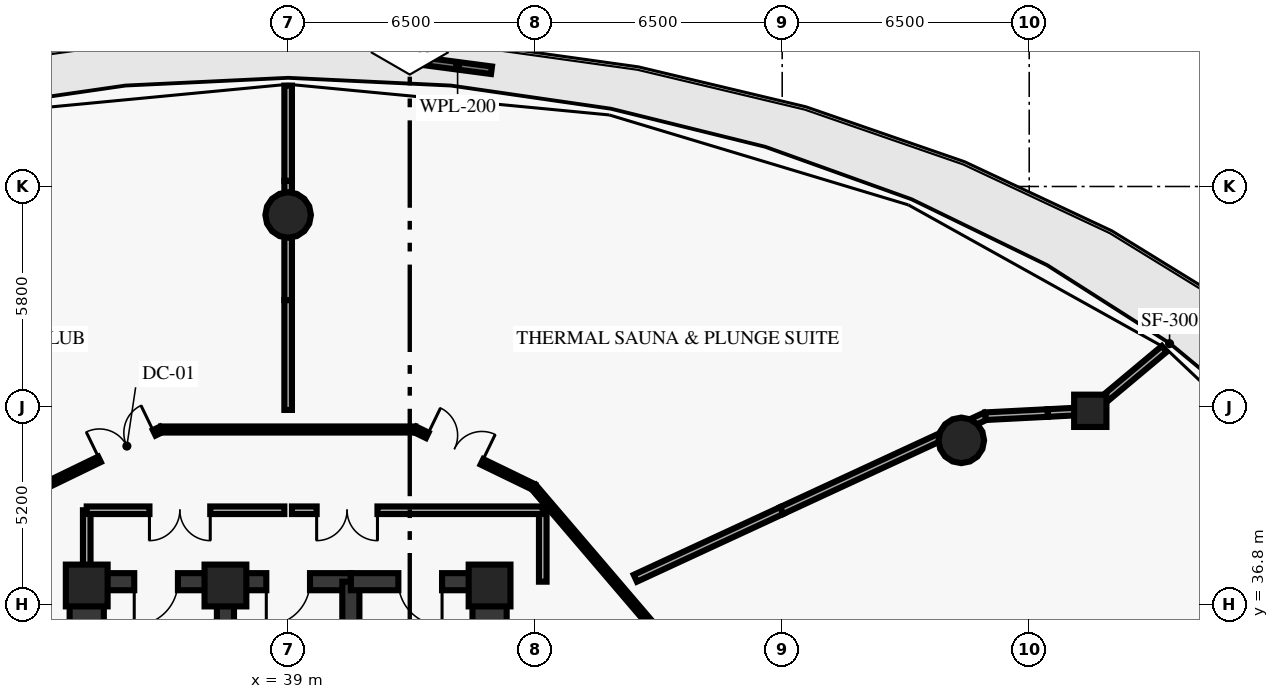
"""IFC4 building model, lengths in metres.
Left out: names, types, materials, properties, quantities, classifications, styles, units other than length and angle.
Written with IfcOpenShell. Run it as: python <this file> out.ifc"""

import sys

from ifc_helpers import new_model, si_unit, direction, frame, frame_2d, origin, origin_2d, place, context, subcontext, project, spatial, rectangle, circle, extrude, element, fill, save


model = new_model("IFC4")
c1 = context("Model", 3, precision=1e-05, world=origin(), true_north=direction((0.0, 1.0)))
c2 = subcontext(c1, "Body", "Model", "MODEL_VIEW")
j1 = project(units=[si_unit("LENGTHUNIT", "METRE"), si_unit("PLANEANGLEUNIT", "RADIAN")], contexts=[c1])
p1 = place(None, origin())
s1 = spatial("IfcSite", under=j1, at=p1, CompositionType="ELEMENT")
p2 = place(p1, origin())
s2 = spatial("IfcBuilding", under=s1, at=p2, CompositionType="ELEMENT")
p3 = place(p2, frame((0.0, 0.0, 16.0)))
s3 = spatial("IfcBuildingStorey", under=s2, at=p3, CompositionType="ELEMENT", Elevation=16.0)
for number, where, z_axis, x_axis in (
    (1, (44.3, 37.3, 0.0), (0.0, 0.0, 1.0), (1.0, 0.0, 0.0)),
    (2, (37.35, 37.3, 0.0), (0.0, 0.0, 1.0), (1.0, 0.0, 0.0)),
    (3, (33.7, 37.3, 0.0), (0.0, 0.0, 1.0), (1.0, 0.0, 0.0)),
):
    element("IfcColumn", number, at=place(p3, frame(where, z_axis=z_axis, x_axis=x_axis)), inside=s3, PredefinedType="PILASTER", context=c2, shape_type="SweptSolid", body=[
        extrude(rectangle(XDim=1.1, YDim=1.1, at=origin_2d()), origin(), (0.0, 0.0, 1.0), 4.74),
    ])
for number, where, z_axis, x_axis in (
    (4, (56.713, 41.119, 0.0), (0.0, 0.0, 1.0), (1.0, 0.0, 0.0)),
    (5, (39.0, 47.05, 0.0), (0.0, 0.0, 1.0), (1.0, 0.0, 0.0)),
):
    element("IfcColumn", number, at=place(p3, frame(where, z_axis=z_axis, x_axis=x_axis)), inside=s3, PredefinedType="COLUMN", context=c2, shape_type="SweptSolid", body=[
        extrude(circle(Radius=0.6, at=origin_2d()), origin(), (0.0, 0.0, 1.0), 4.74),
    ])
p4 = place(p3, frame((60.107, 41.897, 0.0), z_axis=(0.0, 0.0, 1.0), x_axis=(1.0, 0.0, 0.0)))
e6 = element("IfcColumn", 6, at=p4, inside=s3, PredefinedType="COLUMN", context=c2, shape_type="SweptSolid", body=[
    extrude(rectangle(XDim=0.85, YDim=0.85, at=origin_2d()), origin(), (0.0, 0.0, 1.0), 4.74),
])
for number, where, z_axis, x_axis in (
    (7, (33.7, 29.05, 0.0), (0.0, 0.0, 1.0), (0.0, 1.0, 0.0)),
    (8, (44.3, 29.05, 0.0), (0.0, 0.0, 1.0), (0.0, 1.0, 0.0)),
):
    element("IfcWall", number, at=place(p3, frame(where, z_axis=z_axis, x_axis=x_axis)), inside=s3, PredefinedType="SHEAR", context=c2, shape_type="SweptSolid", body=[
        extrude(rectangle(XDim=8.35, YDim=0.9, at=frame_2d((4.175, 0.0))), origin(), (0.0, 0.0, 1.0), 4.74),
    ])
p5 = place(p3, frame((42.566, 51.094, 0.0), z_axis=(0.0, 0.0, 1.0), x_axis=(0.991438597149, -0.130573764914, 0.0)))
e9 = element("IfcWall", 9, at=p5, inside=s3, PredefinedType="ELEMENTEDWALL", context=c2, shape_type="SweptSolid", body=[
    extrude(rectangle(XDim=1.801, YDim=0.2, at=frame_2d((0.9, 0.0))), origin(), (0.0, 0.0, 1.0), 0.65),
])
p6 = place(p3, frame((37.35, 37.4, 0.0), z_axis=(0.0, 0.0, 1.0), x_axis=(-1.0, 0.0, 0.0)))
e10 = element("IfcWall", 10, at=p6, inside=s3, PredefinedType="SHEAR", context=c2, shape_type="SweptSolid", body=[
    extrude(rectangle(XDim=3.65, YDim=0.45, at=frame_2d((1.825, 0.0))), origin(), (0.0, 0.0, 1.0), 4.74),
])
p7 = place(p6, frame((1.25, 0.0, 0.0)))
e11 = element("IfcOpeningElement", 11, at=p7, cuts=e10, PredefinedType="OPENING", context=c2, shape_type="SweptSolid", body=[
    extrude(rectangle(XDim=1.15, YDim=2.15, at=frame_2d((0.575, 1.075))), frame((0.0, 0.235, 0.0), z_axis=(0.0, -1.0, 0.0), x_axis=(1.0, 0.0, 0.0)), (0.0, 0.0, 1.0), 0.47),
])
p8 = place(p3, frame((37.35, 29.05, 0.0), z_axis=(0.0, 0.0, 1.0), x_axis=(0.0, 1.0, 0.0)))
e12 = element("IfcWall", 12, at=p8, inside=s3, PredefinedType="SHEAR", context=c2, shape_type="SweptSolid", body=[
    extrude(rectangle(XDim=8.35, YDim=0.45, at=frame_2d((4.175, 0.0))), origin(), (0.0, 0.0, 1.0), 4.74),
])
p9 = place(p3, frame((40.65, 37.4, 0.0), z_axis=(0.0, 0.0, 1.0), x_axis=(-1.0, 0.0, 0.0)))
e13 = element("IfcWall", 13, at=p9, inside=s3, PredefinedType="SHEAR", context=c2, shape_type="SweptSolid", body=[
    extrude(rectangle(XDim=3.3, YDim=0.45, at=frame_2d((1.65, 0.0))), origin(), (0.0, 0.0, 1.0), 4.74),
])
p10 = place(p9, frame((1.075, 0.0, 0.0)))
e14 = element("IfcOpeningElement", 14, at=p10, cuts=e13, PredefinedType="OPENING", context=c2, shape_type="SweptSolid", body=[
    extrude(rectangle(XDim=1.15, YDim=2.15, at=frame_2d((0.575, 1.075))), frame((0.0, 0.235, 0.0), z_axis=(0.0, -1.0, 0.0), x_axis=(1.0, 0.0, 0.0)), (0.0, 0.0, 1.0), 0.47),
])
p11 = place(p3, frame((40.65, 29.05, 0.0), z_axis=(0.0, 0.0, 1.0), x_axis=(0.0, 1.0, 0.0)))
e15 = element("IfcWall", 15, at=p11, inside=s3, PredefinedType="SHEAR", context=c2, shape_type="SweptSolid", body=[
    extrude(rectangle(XDim=8.35, YDim=0.45, at=frame_2d((4.175, 0.0))), origin(), (0.0, 0.0, 1.0), 4.74),
])
p12 = place(p3, frame((44.3, 37.4, 0.0), z_axis=(0.0, 0.0, 1.0), x_axis=(-1.0, 0.0, 0.0)))
e16 = element("IfcWall", 16, at=p12, inside=s3, PredefinedType="SHEAR", context=c2, shape_type="SweptSolid", body=[
    extrude(rectangle(XDim=3.65, YDim=0.45, at=frame_2d((1.825, 0.0))), origin(), (0.0, 0.0, 1.0), 4.74),
])
p13 = place(p12, frame((1.25, 0.0, 0.0)))
e17 = element("IfcOpeningElement", 17, at=p13, cuts=e16, PredefinedType="OPENING", context=c2, shape_type="SweptSolid", body=[
    extrude(rectangle(XDim=1.15, YDim=2.15, at=frame_2d((0.575, 1.075))), frame((0.0, 0.235, 0.0), z_axis=(0.0, -1.0, 0.0), x_axis=(1.0, 0.0, 0.0)), (0.0, 0.0, 1.0), 0.47),
])
for number, where, z_axis, x_axis in (
    (18, (33.7, 37.4, 0.0), (0.0, 0.0, 1.0), (0.0, 1.0, 0.0)),
    (19, (45.7, 37.4, 0.0), (0.0, 0.0, 1.0), (0.0, 1.0, 0.0)),
):
    element("IfcWall", number, at=place(p3, frame(where, z_axis=z_axis, x_axis=x_axis)), inside=s3, PredefinedType="SOLIDWALL", context=c2, shape_type="SweptSolid", body=[
        extrude(rectangle(XDim=1.88, YDim=0.2, at=frame_2d((0.94, 0.0))), origin(), (0.0, 0.0, 1.0), 4.74),
    ])
p14 = place(p3, frame((38.9, 39.28, 0.0), z_axis=(0.0, 0.0, 1.0), x_axis=(-1.0, 0.0, 0.0)))
e20 = element("IfcWall", 20, at=p14, inside=s3, PredefinedType="SOLIDWALL", context=c2, shape_type="SweptSolid", body=[
    extrude(rectangle(XDim=5.2, YDim=0.2, at=frame_2d((2.6, 0.0))), origin(), (0.0, 0.0, 1.0), 4.74),
])
p15 = place(p14, frame((1.95, 0.0, 0.0)))
e21 = element("IfcOpeningElement", 21, at=p15, cuts=e20, PredefinedType="OPENING", context=c2, shape_type="SweptSolid", body=[
    extrude(rectangle(XDim=1.6, YDim=2.2, at=frame_2d((0.8, 1.1))), frame((0.0, 0.11, 0.0), z_axis=(0.0, -1.0, 0.0), x_axis=(1.0, 0.0, 0.0)), (0.0, 0.0, 1.0), 0.22),
])
p16 = place(p3, frame((45.7, 39.28, 0.0), z_axis=(0.0, 0.0, 1.0), x_axis=(-1.0, 0.0, 0.0)))
e22 = element("IfcWall", 22, at=p16, inside=s3, PredefinedType="SOLIDWALL", context=c2, shape_type="SweptSolid", body=[
    extrude(rectangle(XDim=6.6, YDim=0.2, at=frame_2d((3.3, 0.0))), origin(), (0.0, 0.0, 1.0), 4.74),
])
p17 = place(p16, frame((4.35, 0.0, 0.0)))
e23 = element("IfcOpeningElement", 23, at=p17, cuts=e22, PredefinedType="OPENING", context=c2, shape_type="SweptSolid", body=[
    extrude(rectangle(XDim=1.6, YDim=2.2, at=frame_2d((0.8, 1.1))), frame((0.0, 0.11, 0.0), z_axis=(0.0, -1.0, 0.0), x_axis=(1.0, 0.0, 0.0)), (0.0, 0.0, 1.0), 0.22),
])
p18 = place(p3, frame((50.189, 34.36, 0.0), z_axis=(0.0, 0.0, 1.0), x_axis=(-0.649652680018, 0.760231145998, 0.0)))
e24 = element("IfcWall", 24, at=p18, inside=s3, PredefinedType="PARTITIONING", context=c2, shape_type="SweptSolid", body=[
    extrude(rectangle(XDim=7.279, YDim=0.16, at=frame_2d((3.64, 0.0))), origin(), (0.0, 0.0, 1.0), 4.74),
])
p19 = place(p3, frame((42.344, 41.405, 0.0), z_axis=(0.0, 0.0, 1.0), x_axis=(0.899789784655, -0.436323668199, 0.0)))
e25 = element("IfcWall", 25, at=p19, inside=s3, PredefinedType="PARTITIONING", context=c2, shape_type="SweptSolid", body=[
    extrude(rectangle(XDim=3.463, YDim=0.16, at=frame_2d((1.731, 0.0))), origin(), (0.0, 0.0, 1.0), 4.74),
])
p20 = place(p19, frame((0.351, 0.0, 0.0)))
e26 = element("IfcOpeningElement", 26, at=p20, cuts=e25, PredefinedType="OPENING", context=c2, shape_type="SweptSolid", body=[
    extrude(rectangle(XDim=1.6, YDim=2.2, at=frame_2d((0.8, 1.1))), frame((0.0, 0.09, 0.0), z_axis=(0.0, -1.0, 0.0), x_axis=(1.0, 0.0, 0.0)), (0.0, 0.0, 1.0), 0.18),
])
p21 = place(p3, frame((42.344, 41.405, 0.0), z_axis=(0.0, 0.0, 1.0), x_axis=(-1.0, 0.0, 0.0)))
e27 = element("IfcWall", 27, at=p21, inside=s3, PredefinedType="PARTITIONING", context=c2, shape_type="SweptSolid", body=[
    extrude(rectangle(XDim=6.688, YDim=0.16, at=frame_2d((3.344, 0.0))), origin(), (0.0, 0.0, 1.0), 4.74),
])
p22 = place(p3, frame((32.54, 39.894, 0.0), z_axis=(0.0, 0.0, 1.0), x_axis=(0.899789784655, 0.436323668199, 0.0)))
e28 = element("IfcWall", 28, at=p22, inside=s3, PredefinedType="PARTITIONING", context=c2, shape_type="SweptSolid", body=[
    extrude(rectangle(XDim=3.463, YDim=0.16, at=frame_2d((1.731, 0.0))), origin(), (0.0, 0.0, 1.0), 4.74),
])
p23 = place(p22, frame((1.663, 0.0, 0.0)))
e29 = element("IfcOpeningElement", 29, at=p23, cuts=e28, PredefinedType="OPENING", context=c2, shape_type="SweptSolid", body=[
    extrude(rectangle(XDim=1.6, YDim=2.2, at=frame_2d((0.8, 1.1))), frame((0.0, 0.09, 0.0), z_axis=(0.0, -1.0, 0.0), x_axis=(1.0, 0.0, 0.0)), (0.0, 0.0, 1.0), 0.18),
])
p24 = place(p3, frame((48.136, 37.491, 0.0), z_axis=(0.0, 0.0, 1.0), x_axis=(0.907543218971, 0.419958695231, 0.0)))
e30 = element("IfcWall", 30, at=p24, inside=s3, PredefinedType="PARTITIONING", context=c2, shape_type="SweptSolid", body=[
    extrude(rectangle(XDim=4.246, YDim=0.2, at=frame_2d((2.123, 0.0))), origin(), (0.0, 0.0, 1.0), 4.74),
])
p25 = place(p3, frame((51.989, 39.274, 0.0), z_axis=(0.0, 0.0, 1.0), x_axis=(0.907468259345, 0.420120647293, 0.0)))
e31 = element("IfcWall", 31, at=p25, inside=s3, PredefinedType="PARTITIONING", context=c2, shape_type="SweptSolid", body=[
    extrude(rectangle(XDim=5.099, YDim=0.2, at=frame_2d((2.549, 0.0))), origin(), (0.0, 0.0, 1.0), 2.94),
])
p26 = place(p3, frame((56.616, 41.416, 0.0), z_axis=(0.0, 0.0, 1.0), x_axis=(0.907729224474, 0.419556498025, 0.0)))
e32 = element("IfcWall", 32, at=p26, inside=s3, PredefinedType="PARTITIONING", context=c2, shape_type="SweptSolid", body=[
    extrude(rectangle(XDim=0.808, YDim=0.2, at=frame_2d((0.404, 0.0))), origin(), (0.0, 0.0, 1.0), 4.74),
])
p27 = place(p3, frame((57.349, 41.755, 0.0), z_axis=(0.0, 0.0, 1.0), x_axis=(0.998685128887, 0.051264152576, 0.0)))
e33 = element("IfcWall", 33, at=p27, inside=s3, PredefinedType="PARTITIONING", context=c2, shape_type="SweptSolid", body=[
    extrude(rectangle(XDim=1.643, YDim=0.2, at=frame_2d((0.822, 0.0))), origin(), (0.0, 0.0, 1.0), 4.74),
])
p28 = place(p3, frame((58.99, 41.839, 0.0), z_axis=(0.0, 0.0, 1.0), x_axis=(0.998660904733, 0.051733909163, 0.0)))
e34 = element("IfcWall", 34, at=p28, inside=s3, PredefinedType="PARTITIONING", context=c2, shape_type="SweptSolid", body=[
    extrude(rectangle(XDim=1.118, YDim=0.2, at=frame_2d((0.559, 0.0))), origin(), (0.0, 0.0, 1.0), 4.28),
])
p29 = place(p3, frame((60.107, 41.897, 0.0), z_axis=(0.0, 0.0, 1.0), x_axis=(0.766903980595, 0.641761859686, 0.0)))
e35 = element("IfcWall", 35, at=p29, inside=s3, PredefinedType="PARTITIONING", context=c2, shape_type="SweptSolid", body=[
    extrude(rectangle(XDim=2.54, YDim=0.2, at=frame_2d((1.27, 0.0))), origin(), (0.0, 0.0, 1.0), 4.74),
])
p30 = place(p3, frame((39.0, 41.92, 0.0), z_axis=(0.0, 0.0, 1.0), x_axis=(0.0, 1.0, 0.0)))
e36 = element("IfcWall", 36, at=p30, inside=s3, PredefinedType="PARTITIONING", context=c2, shape_type="SweptSolid", body=[
    extrude(rectangle(XDim=2.891, YDim=0.2, at=frame_2d((1.446, 0.0))), origin(), (0.0, 0.0, 1.0), 4.74),
])
p31 = place(p3, frame((39.0, 44.811, 0.0), z_axis=(0.0, 0.0, 1.0), x_axis=(0.0, 1.0, 0.0)))
e37 = element("IfcWall", 37, at=p31, inside=s3, PredefinedType="PARTITIONING", context=c2, shape_type="SweptSolid", body=[
    extrude(rectangle(XDim=2.256, YDim=0.2, at=frame_2d((1.128, 0.0))), origin(), (0.0, 0.0, 1.0), 3.09),
])
p32 = place(p3, frame((39.0, 47.067, 0.0), z_axis=(0.0, 0.0, 1.0), x_axis=(0.0, 1.0, 0.0)))
e38 = element("IfcWall", 38, at=p32, inside=s3, PredefinedType="PARTITIONING", context=c2, shape_type="SweptSolid", body=[
    extrude(rectangle(XDim=0.883, YDim=0.2, at=frame_2d((0.441, 0.0))), origin(), (0.0, 0.0, 1.0), 4.74),
])
p33 = place(p3, frame((39.0, 47.95, 0.0), z_axis=(0.0, 0.0, 1.0), x_axis=(0.0, 1.0, 0.0)))
e39 = element("IfcWall", 39, at=p33, inside=s3, PredefinedType="PARTITIONING", context=c2, shape_type="SweptSolid", body=[
    extrude(rectangle(XDim=2.505, YDim=0.2, at=frame_2d((1.252, 0.0))), origin(), (0.0, 0.0, 1.0), 4.74),
])
p34 = place(p7, origin())
e40 = element("IfcDoor", 40, at=p34, inside=s3, OperationType="SINGLE_SWING_RIGHT", PredefinedType="DOOR", context=c2, shape_type="SweptSolid", body=[
    extrude(rectangle(XDim=1.15, YDim=2.15, at=frame_2d((0.575, 1.075))), frame((0.0, 0.025, 0.0), z_axis=(0.0, -1.0, 0.0), x_axis=(1.0, 0.0, 0.0)), (0.0, 0.0, 1.0), 0.05),
])
fill(e11, e40)
p35 = place(p10, origin())
e41 = element("IfcDoor", 41, at=p35, inside=s3, OperationType="SINGLE_SWING_RIGHT", PredefinedType="DOOR", context=c2, shape_type="SweptSolid", body=[
    extrude(rectangle(XDim=1.15, YDim=2.15, at=frame_2d((0.575, 1.075))), frame((0.0, 0.025, 0.0), z_axis=(0.0, -1.0, 0.0), x_axis=(1.0, 0.0, 0.0)), (0.0, 0.0, 1.0), 0.05),
])
fill(e14, e41)
p36 = place(p13, origin())
e42 = element("IfcDoor", 42, at=p36, inside=s3, OperationType="SINGLE_SWING_LEFT", PredefinedType="DOOR", context=c2, shape_type="SweptSolid", body=[
    extrude(rectangle(XDim=1.15, YDim=2.15, at=frame_2d((0.575, 1.075))), frame((0.0, 0.025, 0.0), z_axis=(0.0, -1.0, 0.0), x_axis=(1.0, 0.0, 0.0)), (0.0, 0.0, 1.0), 0.05),
])
fill(e17, e42)
p37 = place(p15, origin())
e43 = element("IfcDoor", 43, at=p37, inside=s3, OperationType="DOUBLE_DOOR_SINGLE_SWING", PredefinedType="DOOR", context=c2, shape_type="SweptSolid", body=[
    extrude(rectangle(XDim=1.6, YDim=2.2, at=frame_2d((0.8, 1.1))), frame((0.0, 0.025, 0.0), z_axis=(0.0, -1.0, 0.0), x_axis=(1.0, 0.0, 0.0)), (0.0, 0.0, 1.0), 0.05),
])
fill(e21, e43)
p38 = place(p17, origin())
e44 = element("IfcDoor", 44, at=p38, inside=s3, OperationType="DOUBLE_DOOR_SINGLE_SWING", PredefinedType="DOOR", context=c2, shape_type="SweptSolid", body=[
    extrude(rectangle(XDim=1.6, YDim=2.2, at=frame_2d((0.8, 1.1))), frame((0.0, 0.025, 0.0), z_axis=(0.0, -1.0, 0.0), x_axis=(1.0, 0.0, 0.0)), (0.0, 0.0, 1.0), 0.05),
])
fill(e23, e44)
p39 = place(p20, origin())
e45 = element("IfcDoor", 45, at=p39, inside=s3, OperationType="DOUBLE_DOOR_SINGLE_SWING", PredefinedType="DOOR", context=c2, shape_type="SweptSolid", body=[
    extrude(rectangle(XDim=1.6, YDim=2.2, at=frame_2d((0.8, 1.1))), frame((0.0, 0.025, 0.0), z_axis=(0.0, -1.0, 0.0), x_axis=(1.0, 0.0, 0.0)), (0.0, 0.0, 1.0), 0.05),
])
fill(e26, e45)
p40 = place(p23, origin())
e46 = element("IfcDoor", 46, at=p40, inside=s3, OperationType="DOUBLE_DOOR_SINGLE_SWING", PredefinedType="DOOR", context=c2, shape_type="SweptSolid", body=[
    extrude(rectangle(XDim=1.6, YDim=2.2, at=frame_2d((0.8, 1.1))), frame((0.0, 0.025, 0.0), z_axis=(0.0, -1.0, 0.0), x_axis=(1.0, 0.0, 0.0)), (0.0, 0.0, 1.0), 0.05),
])
fill(e29, e46)
save(model, sys.argv[1])
